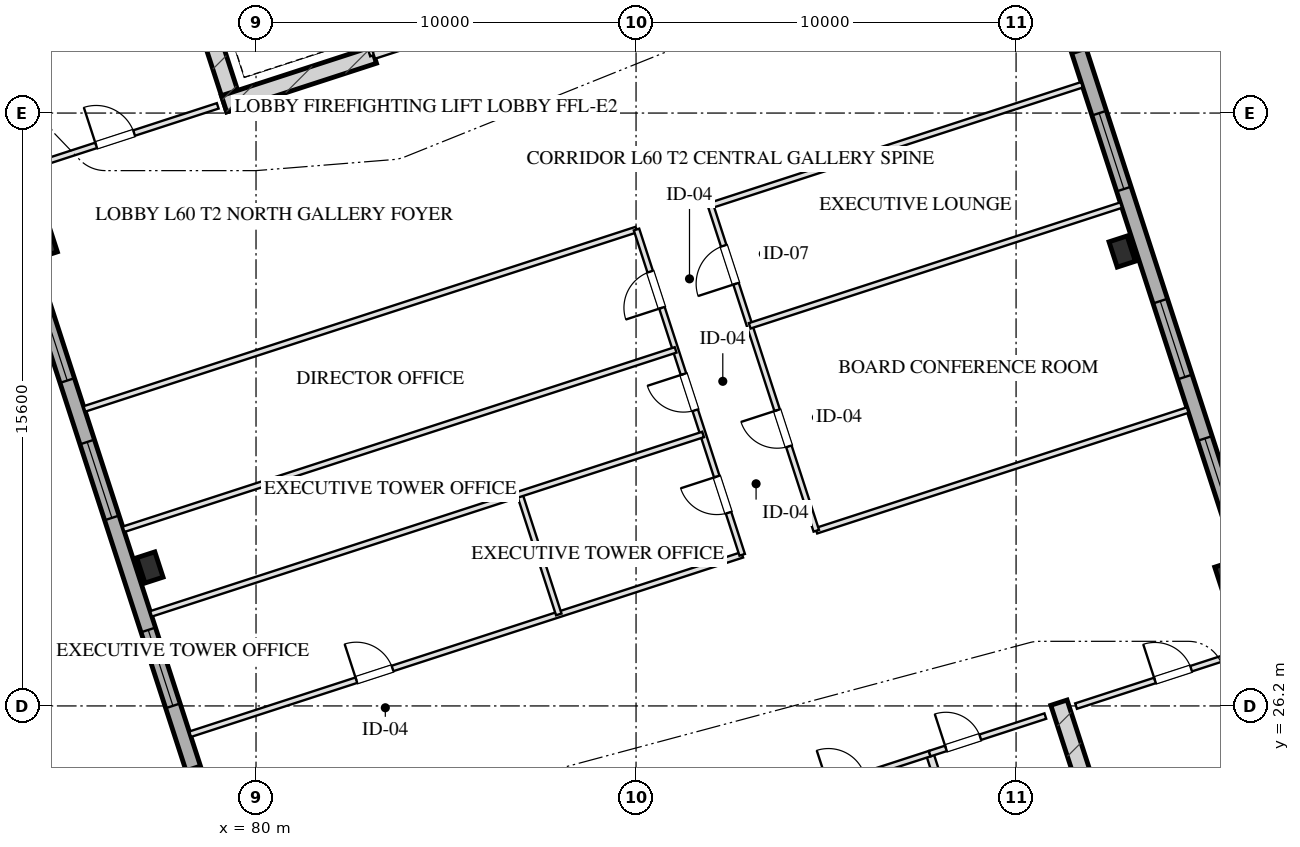
"""IFC4 building model, lengths in metres.
Left out: names, types, materials, properties, quantities, classifications, styles, units other than length and angle.
Written with IfcOpenShell. Run it as: python <this file> out.ifc"""

import sys

from ifc_helpers import new_model, si_unit, direction, frame, frame_2d, origin, origin_2d, place, context, subcontext, project, spatial, rectangle, hollow_rectangle, extrude, element, fill, save


model = new_model("IFC4")
c1 = context("Model", 3, precision=1e-05, world=origin(), true_north=direction((0.0, 1.0)))
c2 = subcontext(c1, "Body", "Model", "MODEL_VIEW")
j1 = project(units=[si_unit("LENGTHUNIT", "METRE"), si_unit("PLANEANGLEUNIT", "RADIAN")], contexts=[c1])
p1 = place(None, origin())
s1 = spatial("IfcSite", under=j1, at=p1, CompositionType="ELEMENT")
p2 = place(p1, origin())
s2 = spatial("IfcBuilding", under=s1, at=p2, CompositionType="ELEMENT")
p3 = place(p2, frame((0.0, 0.0, 223.1)))
s3 = spatial("IfcBuildingStorey", under=s2, at=p3, CompositionType="ELEMENT", Elevation=223.1)
for number, where, z_axis, x_axis in (
    (1, (101.128, 26.286, 0.0), (0.0, 0.0, 1.0), (0.309, -0.951, 0.0)),
    (2, (79.442, 41.899, 0.0), (0.0, 0.0, 1.0), (-0.309, 0.951, 0.0)),
):
    element("IfcWall", number, at=place(p3, frame(where, z_axis=z_axis, x_axis=x_axis)), inside=s3, PredefinedType="SHEAR", context=c2, shape_type="SweptSolid", body=[
        extrude(rectangle(XDim=9.33, YDim=0.45, at=frame_2d((4.665, 0.0))), origin(), (0.0, 0.0, 1.0), 3.45),
    ])
p4 = place(p3, frame((79.159, 42.043, 0.0), z_axis=(0.0, 0.0, 1.0), x_axis=(0.951047485828, 0.309044785913, 0.0)))
e3 = element("IfcWall", 3, at=p4, inside=s3, PredefinedType="SHEAR", context=c2, shape_type="SweptSolid", body=[
    extrude(rectangle(XDim=4.145, YDim=0.45, at=frame_2d((2.073, 0.0))), origin(), (0.0, 0.0, 1.0), 3.45),
])
for number, where, z_axis, x_axis in (
    (4, (77.208, 29.844, 0.0), (0.0, 0.0, 1.0), (0.951, 0.309, 0.0)),
    (5, (74.427, 38.403, 0.0), (0.0, 0.0, 1.0), (0.951, 0.309, 0.0)),
    (6, (105.573, 29.597, 0.0), (0.0, 0.0, 1.0), (0.951, 0.309, 0.0)),
    (7, (102.792, 38.156, 0.0), (0.0, 0.0, 1.0), (0.951, 0.309, 0.0)),
):
    element("IfcColumn", number, at=place(p3, frame(where, z_axis=z_axis, x_axis=x_axis)), inside=s3, PredefinedType="COLUMN", context=c2, shape_type="SweptSolid", body=[
        extrude(hollow_rectangle(XDim=0.5, YDim=0.7, WallThickness=0.025, at=origin_2d()), origin(), (0.0, 0.0, 1.0), 3.451),
    ])
p5 = place(p3, frame((82.618, 11.414, 0.0), z_axis=(0.0, 0.0, 1.0), x_axis=(-0.309016491071, 0.951056679828, 0.0)))
e8 = element("IfcWall", 8, at=p5, inside=s3, PredefinedType="SOLIDWALL", context=c2, shape_type="SweptSolid", body=[
    extrude(rectangle(XDim=38.4, YDim=0.4, at=frame_2d((19.2, 0.0))), origin(), (0.0, 0.0, 1.0), 2.61),
])
p6 = place(p5, frame((11.75, 0.0, 0.75)))
e9 = element("IfcOpeningElement", 9, at=p6, cuts=e8, PredefinedType="OPENING", context=c2, shape_type="SweptSolid", body=[
    extrude(rectangle(XDim=2.1, YDim=1.46, at=frame_2d((1.05, 0.73))), frame((0.0, 0.21, 0.0), z_axis=(0.0, -1.0, 0.0), x_axis=(1.0, 0.0, 0.0)), (0.0, 0.0, 1.0), 0.42),
])
p7 = place(p5, frame((15.55, 0.0, 0.75)))
e10 = element("IfcOpeningElement", 10, at=p7, cuts=e8, PredefinedType="OPENING", context=c2, shape_type="SweptSolid", body=[
    extrude(rectangle(XDim=2.1, YDim=1.46, at=frame_2d((1.05, 0.73))), frame((0.0, 0.21, 0.0), z_axis=(0.0, -1.0, 0.0), x_axis=(1.0, 0.0, 0.0)), (0.0, 0.0, 1.0), 0.42),
])
p8 = place(p5, frame((20.75, 0.0, 0.75)))
e11 = element("IfcOpeningElement", 11, at=p8, cuts=e8, PredefinedType="OPENING", context=c2, shape_type="SweptSolid", body=[
    extrude(rectangle(XDim=2.1, YDim=1.46, at=frame_2d((1.05, 0.73))), frame((0.0, 0.21, 0.0), z_axis=(0.0, -1.0, 0.0), x_axis=(1.0, 0.0, 0.0)), (0.0, 0.0, 1.0), 0.42),
])
p9 = place(p5, frame((24.55, 0.0, 0.75)))
e12 = element("IfcOpeningElement", 12, at=p9, cuts=e8, PredefinedType="OPENING", context=c2, shape_type="SweptSolid", body=[
    extrude(rectangle(XDim=2.1, YDim=1.46, at=frame_2d((1.05, 0.73))), frame((0.0, 0.21, 0.0), z_axis=(0.0, -1.0, 0.0), x_axis=(1.0, 0.0, 0.0)), (0.0, 0.0, 1.0), 0.42),
])
p10 = place(p3, frame((97.382, 56.586, 0.0), z_axis=(0.0, 0.0, 1.0), x_axis=(0.309016491071, -0.951056679828, 0.0)))
e13 = element("IfcWall", 13, at=p10, inside=s3, PredefinedType="SOLIDWALL", context=c2, shape_type="SweptSolid", body=[
    extrude(rectangle(XDim=38.4, YDim=0.4, at=frame_2d((19.2, 0.0))), origin(), (0.0, 0.0, 1.0), 2.61),
])
p11 = place(p10, frame((24.55, 0.0, 0.75)))
e14 = element("IfcOpeningElement", 14, at=p11, cuts=e13, PredefinedType="OPENING", context=c2, shape_type="SweptSolid", body=[
    extrude(rectangle(XDim=2.1, YDim=1.46, at=frame_2d((1.05, 0.73))), frame((0.0, 0.21, 0.0), z_axis=(0.0, -1.0, 0.0), x_axis=(1.0, 0.0, 0.0)), (0.0, 0.0, 1.0), 0.42),
])
p12 = place(p10, frame((20.75, 0.0, 0.75)))
e15 = element("IfcOpeningElement", 15, at=p12, cuts=e13, PredefinedType="OPENING", context=c2, shape_type="SweptSolid", body=[
    extrude(rectangle(XDim=2.1, YDim=1.46, at=frame_2d((1.05, 0.73))), frame((0.0, 0.21, 0.0), z_axis=(0.0, -1.0, 0.0), x_axis=(1.0, 0.0, 0.0)), (0.0, 0.0, 1.0), 0.42),
])
p13 = place(p10, frame((15.55, 0.0, 0.75)))
e16 = element("IfcOpeningElement", 16, at=p13, cuts=e13, PredefinedType="OPENING", context=c2, shape_type="SweptSolid", body=[
    extrude(rectangle(XDim=2.1, YDim=1.46, at=frame_2d((1.05, 0.73))), frame((0.0, 0.21, 0.0), z_axis=(0.0, -1.0, 0.0), x_axis=(1.0, 0.0, 0.0)), (0.0, 0.0, 1.0), 0.42),
])
p14 = place(p10, frame((11.75, 0.0, 0.75)))
e17 = element("IfcOpeningElement", 17, at=p14, cuts=e13, PredefinedType="OPENING", context=c2, shape_type="SweptSolid", body=[
    extrude(rectangle(XDim=2.1, YDim=1.46, at=frame_2d((1.05, 0.73))), frame((0.0, 0.21, 0.0), z_axis=(0.0, -1.0, 0.0), x_axis=(1.0, 0.0, 0.0)), (0.0, 0.0, 1.0), 0.42),
])
p15 = place(p3, frame((97.727, 24.944, 0.0), z_axis=(0.0, 0.0, 1.0), x_axis=(0.309016001439, -0.951056838919, 0.0)))
e18 = element("IfcWall", 18, at=p15, inside=s3, PredefinedType="PARTITIONING", context=c2, shape_type="SweptSolid", body=[
    extrude(rectangle(XDim=8.43, YDim=0.2, at=frame_2d((4.215, 0.0))), origin(), (0.0, 0.0, 1.0), 3.175),
])
p16 = place(p3, frame((93.542, 23.585, 0.0), z_axis=(0.0, 0.0, 1.0), x_axis=(0.951063829732, 0.308994485023, 0.0)))
e19 = element("IfcWall", 19, at=p16, inside=s3, PredefinedType="PARTITIONING", context=c2, shape_type="SweptSolid", body=[
    extrude(rectangle(XDim=4.4, YDim=0.15, at=frame_2d((2.2, 0.0))), origin(), (0.0, 0.0, 1.0), 3.175),
])
p17 = place(p16, frame((1.6, 0.0, 0.0)))
e20 = element("IfcOpeningElement", 20, at=p17, cuts=e19, PredefinedType="OPENING", context=c2, shape_type="SweptSolid", body=[
    extrude(rectangle(XDim=1.0, YDim=2.05, at=frame_2d((0.5, 1.025))), frame((0.0, 0.085, 0.0), z_axis=(0.0, -1.0, 0.0), x_axis=(1.0, 0.0, 0.0)), (0.0, 0.0, 1.0), 0.17),
])
p18 = place(p3, frame((97.727, 24.944, 0.0), z_axis=(0.0, 0.0, 1.0), x_axis=(0.951036872128, 0.309077446369, 0.0)))
e21 = element("IfcWall", 21, at=p18, inside=s3, PredefinedType="PARTITIONING", context=c2, shape_type="SweptSolid", body=[
    extrude(rectangle(XDim=3.2, YDim=0.15, at=frame_2d((1.6, 0.0))), origin(), (0.0, 0.0, 1.0), 3.175),
])
p19 = place(p18, frame((0.45, 0.0, 0.0)))
e22 = element("IfcOpeningElement", 22, at=p19, cuts=e21, PredefinedType="OPENING", context=c2, shape_type="SweptSolid", body=[
    extrude(rectangle(XDim=0.95, YDim=2.05, at=frame_2d((0.475, 1.025))), frame((0.0, 0.085, 0.0), z_axis=(0.0, -1.0, 0.0), x_axis=(1.0, 0.0, 0.0)), (0.0, 0.0, 1.0), 0.17),
])
p20 = place(p3, frame((83.101, 43.324, 0.0), z_axis=(0.0, 0.0, 1.0), x_axis=(-0.309048298632, 0.951046344356, 0.0)))
e23 = element("IfcWall", 23, at=p20, inside=s3, PredefinedType="PARTITIONING", context=c2, shape_type="SweptSolid", body=[
    extrude(rectangle(XDim=1.9, YDim=0.2, at=frame_2d((0.95, 0.0))), origin(), (0.0, 0.0, 1.0), 3.175),
])
p21 = place(p20, frame((0.52, 0.0, 0.0)))
e24 = element("IfcOpeningElement", 24, at=p21, cuts=e23, PredefinedType="OPENING", context=c2, shape_type="SweptSolid", body=[
    extrude(rectangle(XDim=1.1, YDim=2.05, at=frame_2d((0.55, 1.025))), frame((0.0, 0.11, 0.0), z_axis=(0.0, -1.0, 0.0), x_axis=(1.0, 0.0, 0.0)), (0.0, 0.0, 1.0), 0.22),
])
p22 = place(p3, frame((83.101, 43.324, 0.0), z_axis=(0.0, 0.0, 1.0), x_axis=(0.951052804469, 0.309028417967, 0.0)))
e25 = element("IfcWall", 25, at=p22, inside=s3, PredefinedType="PARTITIONING", context=c2, shape_type="SweptSolid", body=[
    extrude(rectangle(XDim=3.83, YDim=0.2, at=frame_2d((1.915, 0.0))), origin(), (0.0, 0.0, 1.0), 3.175),
])
p23 = place(p22, frame((1.35, 0.0, 0.0)))
e26 = element("IfcOpeningElement", 26, at=p23, cuts=e25, PredefinedType="OPENING", context=c2, shape_type="SweptSolid", body=[
    extrude(rectangle(XDim=1.2, YDim=2.05, at=frame_2d((0.6, 1.025))), frame((0.0, 0.11, 0.0), z_axis=(0.0, -1.0, 0.0), x_axis=(1.0, 0.0, 0.0)), (0.0, 0.0, 1.0), 0.22),
])
p24 = place(p3, frame((101.578, 26.196, 0.0), z_axis=(0.0, 0.0, 1.0), x_axis=(0.951064427824, 0.308992644131, 0.0)))
e27 = element("IfcWall", 27, at=p24, inside=s3, PredefinedType="PARTITIONING", context=c2, shape_type="SweptSolid", body=[
    extrude(rectangle(XDim=5.2, YDim=0.15, at=frame_2d((2.6, 0.0))), origin(), (0.0, 0.0, 1.0), 3.175),
])
p25 = place(p24, frame((2.184, 0.0, 0.0)))
e28 = element("IfcOpeningElement", 28, at=p25, cuts=e27, PredefinedType="OPENING", context=c2, shape_type="SweptSolid", body=[
    extrude(rectangle(XDim=1.0, YDim=2.05, at=frame_2d((0.5, 1.025))), frame((0.0, 0.085, 0.0), z_axis=(0.0, -1.0, 0.0), x_axis=(1.0, 0.0, 0.0)), (0.0, 0.0, 1.0), 0.17),
])
p26 = place(p3, frame((73.476, 40.197, 0.0), z_axis=(0.0, 0.0, 1.0), x_axis=(0.951059431056, 0.309008023519, 0.0)))
e29 = element("IfcWall", 29, at=p26, inside=s3, PredefinedType="PARTITIONING", context=c2, shape_type="SweptSolid", body=[
    extrude(rectangle(XDim=5.8, YDim=0.15, at=frame_2d((2.9, 0.0))), origin(), (0.0, 0.0, 1.0), 3.175),
])
p27 = place(p26, frame((2.436, 0.0, 0.0)))
e30 = element("IfcOpeningElement", 30, at=p27, cuts=e29, PredefinedType="OPENING", context=c2, shape_type="SweptSolid", body=[
    extrude(rectangle(XDim=1.05, YDim=2.05, at=frame_2d((0.525, 1.025))), frame((0.0, 0.085, 0.0), z_axis=(0.0, -1.0, 0.0), x_axis=(1.0, 0.0, 0.0)), (0.0, 0.0, 1.0), 0.17),
])
p28 = place(p3, frame((78.266, 25.456, 0.0), z_axis=(0.0, 0.0, 1.0), x_axis=(0.951056617779, 0.30901668204, 0.0)))
e31 = element("IfcWall", 31, at=p28, inside=s3, PredefinedType="PARTITIONING", context=c2, shape_type="SweptSolid", body=[
    extrude(rectangle(XDim=15.275, YDim=0.15, at=frame_2d((7.637, 0.0))), origin(), (0.0, 0.0, 1.0), 3.175),
])
p29 = place(p28, frame((4.6, 0.0, 0.0)))
e32 = element("IfcOpeningElement", 32, at=p29, cuts=e31, PredefinedType="OPENING", context=c2, shape_type="SweptSolid", body=[
    extrude(rectangle(XDim=1.0, YDim=2.05, at=frame_2d((0.5, 1.025))), frame((0.0, 0.085, 0.0), z_axis=(0.0, -1.0, 0.0), x_axis=(1.0, 0.0, 0.0)), (0.0, 0.0, 1.0), 0.17),
])
p30 = place(p3, frame((94.743, 30.81, 0.0), z_axis=(0.0, 0.0, 1.0), x_axis=(0.951058162647, 0.309011927378, 0.0)))
e33 = element("IfcWall", 33, at=p30, inside=s3, PredefinedType="PARTITIONING", context=c2, shape_type="SweptSolid", body=[
    extrude(rectangle(XDim=10.275, YDim=0.15, at=frame_2d((5.137, 0.0))), origin(), (0.0, 0.0, 1.0), 3.175),
])
p31 = place(p3, frame((75.485, 34.015, 0.0), z_axis=(0.0, 0.0, 1.0), x_axis=(0.951056617779, 0.30901668204, 0.0)))
e34 = element("IfcWall", 34, at=p31, inside=s3, PredefinedType="PARTITIONING", context=c2, shape_type="SweptSolid", body=[
    extrude(rectangle(XDim=15.275, YDim=0.15, at=frame_2d((7.637, 0.0))), origin(), (0.0, 0.0, 1.0), 3.175),
])
p32 = place(p3, frame((91.962, 39.369, 0.0), z_axis=(0.0, 0.0, 1.0), x_axis=(0.951058162647, 0.309011927378, 0.0)))
e35 = element("IfcWall", 35, at=p32, inside=s3, PredefinedType="PARTITIONING", context=c2, shape_type="SweptSolid", body=[
    extrude(rectangle(XDim=10.275, YDim=0.15, at=frame_2d((5.137, 0.0))), origin(), (0.0, 0.0, 1.0), 3.175),
])
p33 = place(p3, frame((92.793, 30.176, 0.0), z_axis=(0.0, 0.0, 1.0), x_axis=(-0.309024734286, 0.951054001411, 0.0)))
e36 = element("IfcWall", 36, at=p33, inside=s3, PredefinedType="PARTITIONING", context=c2, shape_type="SweptSolid", body=[
    extrude(rectangle(XDim=9.0, YDim=0.15, at=frame_2d((4.5, 0.0))), origin(), (0.0, 0.0, 1.0), 3.175),
])
p34 = place(p33, frame((1.165, 0.0, 0.0)))
e37 = element("IfcOpeningElement", 37, at=p34, cuts=e36, PredefinedType="OPENING", context=c2, shape_type="SweptSolid", body=[
    extrude(rectangle(XDim=1.0, YDim=2.05, at=frame_2d((0.5, 1.025))), frame((0.0, 0.085, 0.0), z_axis=(0.0, -1.0, 0.0), x_axis=(1.0, 0.0, 0.0)), (0.0, 0.0, 1.0), 0.17),
])
p35 = place(p33, frame((4.0, 0.0, 0.0)))
e38 = element("IfcOpeningElement", 38, at=p35, cuts=e36, PredefinedType="OPENING", context=c2, shape_type="SweptSolid", body=[
    extrude(rectangle(XDim=1.0, YDim=2.05, at=frame_2d((0.5, 1.025))), frame((0.0, 0.085, 0.0), z_axis=(0.0, -1.0, 0.0), x_axis=(1.0, 0.0, 0.0)), (0.0, 0.0, 1.0), 0.17),
])
p36 = place(p33, frame((6.835, 0.0, 0.0)))
e39 = element("IfcOpeningElement", 39, at=p36, cuts=e36, PredefinedType="OPENING", context=c2, shape_type="SweptSolid", body=[
    extrude(rectangle(XDim=1.0, YDim=2.05, at=frame_2d((0.5, 1.025))), frame((0.0, 0.085, 0.0), z_axis=(0.0, -1.0, 0.0), x_axis=(1.0, 0.0, 0.0)), (0.0, 0.0, 1.0), 0.17),
])
p37 = place(p3, frame((94.743, 30.81, 0.0), z_axis=(0.0, 0.0, 1.0), x_axis=(-0.309024734286, 0.951054001411, 0.0)))
e40 = element("IfcWall", 40, at=p37, inside=s3, PredefinedType="PARTITIONING", context=c2, shape_type="SweptSolid", body=[
    extrude(rectangle(XDim=9.0, YDim=0.15, at=frame_2d((4.5, 0.0))), origin(), (0.0, 0.0, 1.0), 3.175),
])
p38 = place(p37, frame((2.335, 0.0, 0.0)))
e41 = element("IfcOpeningElement", 41, at=p38, cuts=e40, PredefinedType="OPENING", context=c2, shape_type="SweptSolid", body=[
    extrude(rectangle(XDim=1.0, YDim=2.05, at=frame_2d((0.5, 1.025))), frame((0.0, 0.085, 0.0), z_axis=(0.0, -1.0, 0.0), x_axis=(1.0, 0.0, 0.0)), (0.0, 0.0, 1.0), 0.17),
])
p39 = place(p37, frame((6.835, 0.0, 0.0)))
e42 = element("IfcOpeningElement", 42, at=p39, cuts=e40, PredefinedType="OPENING", context=c2, shape_type="SweptSolid", body=[
    extrude(rectangle(XDim=1.05, YDim=2.05, at=frame_2d((0.525, 1.025))), frame((0.0, 0.085, 0.0), z_axis=(0.0, -1.0, 0.0), x_axis=(1.0, 0.0, 0.0)), (0.0, 0.0, 1.0), 0.17),
])
p40 = place(p3, frame((87.967, 28.608, 0.0), z_axis=(0.0, 0.0, 1.0), x_axis=(-0.309004845045, 0.951060463766, 0.0)))
e43 = element("IfcWall", 43, at=p40, inside=s3, PredefinedType="PARTITIONING", context=c2, shape_type="SweptSolid", body=[
    extrude(rectangle(XDim=3.33, YDim=0.15, at=frame_2d((1.665, 0.0))), origin(), (0.0, 0.0, 1.0), 3.175),
])
for number, where, z_axis, x_axis in (
    (44, (77.237, 28.623, 0.0), (0.0, 0.0, 1.0), (0.951, 0.309, 0.0)),
    (45, (76.514, 30.848, 0.0), (0.0, 0.0, 1.0), (0.951, 0.309, 0.0)),
):
    element("IfcWall", number, at=place(p3, frame(where, z_axis=z_axis, x_axis=x_axis)), inside=s3, PredefinedType="PARTITIONING", context=c2, shape_type="SweptSolid", body=[
        extrude(rectangle(XDim=15.275, YDim=0.15, at=frame_2d((7.637, 0.0))), origin(), (0.0, 0.0, 1.0), 3.175),
    ])
p41 = place(p3, frame((92.991, 36.202, 0.0), z_axis=(0.0, 0.0, 1.0), x_axis=(0.951051179373, 0.309033419251, 0.0)))
e46 = element("IfcWall", 46, at=p41, inside=s3, PredefinedType="PARTITIONING", context=c2, shape_type="SweptSolid", body=[
    extrude(rectangle(XDim=10.275, YDim=0.15, at=frame_2d((5.137, 0.0))), origin(), (0.0, 0.0, 1.0), 3.175),
])
p42 = place(p6, origin())
e47 = element("IfcWindow", 47, at=p42, inside=s3, PartitioningType="TRIPLE_PANEL_VERTICAL", PredefinedType="WINDOW", context=c2, shape_type="SweptSolid", body=[
    extrude(rectangle(XDim=2.1, YDim=1.46, at=frame_2d((1.05, 0.73))), frame((0.0, 0.03, 0.0), z_axis=(0.0, -1.0, 0.0), x_axis=(1.0, 0.0, 0.0)), (0.0, 0.0, 1.0), 0.06),
])
fill(e9, e47)
p43 = place(p7, origin())
e48 = element("IfcWindow", 48, at=p43, inside=s3, PartitioningType="TRIPLE_PANEL_VERTICAL", PredefinedType="WINDOW", context=c2, shape_type="SweptSolid", body=[
    extrude(rectangle(XDim=2.1, YDim=1.46, at=frame_2d((1.05, 0.73))), frame((0.0, 0.03, 0.0), z_axis=(0.0, -1.0, 0.0), x_axis=(1.0, 0.0, 0.0)), (0.0, 0.0, 1.0), 0.06),
])
fill(e10, e48)
p44 = place(p8, origin())
e49 = element("IfcWindow", 49, at=p44, inside=s3, PartitioningType="TRIPLE_PANEL_VERTICAL", PredefinedType="WINDOW", context=c2, shape_type="SweptSolid", body=[
    extrude(rectangle(XDim=2.1, YDim=1.46, at=frame_2d((1.05, 0.73))), frame((0.0, 0.03, 0.0), z_axis=(0.0, -1.0, 0.0), x_axis=(1.0, 0.0, 0.0)), (0.0, 0.0, 1.0), 0.06),
])
fill(e11, e49)
p45 = place(p9, origin())
e50 = element("IfcWindow", 50, at=p45, inside=s3, PartitioningType="TRIPLE_PANEL_VERTICAL", PredefinedType="WINDOW", context=c2, shape_type="SweptSolid", body=[
    extrude(rectangle(XDim=2.1, YDim=1.46, at=frame_2d((1.05, 0.73))), frame((0.0, 0.03, 0.0), z_axis=(0.0, -1.0, 0.0), x_axis=(1.0, 0.0, 0.0)), (0.0, 0.0, 1.0), 0.06),
])
fill(e12, e50)
p46 = place(p11, origin())
e51 = element("IfcWindow", 51, at=p46, inside=s3, PartitioningType="TRIPLE_PANEL_VERTICAL", PredefinedType="WINDOW", context=c2, shape_type="SweptSolid", body=[
    extrude(rectangle(XDim=2.1, YDim=1.46, at=frame_2d((1.05, 0.73))), frame((0.0, 0.03, 0.0), z_axis=(0.0, -1.0, 0.0), x_axis=(1.0, 0.0, 0.0)), (0.0, 0.0, 1.0), 0.06),
])
fill(e14, e51)
p47 = place(p12, origin())
e52 = element("IfcWindow", 52, at=p47, inside=s3, PartitioningType="TRIPLE_PANEL_VERTICAL", PredefinedType="WINDOW", context=c2, shape_type="SweptSolid", body=[
    extrude(rectangle(XDim=2.1, YDim=1.46, at=frame_2d((1.05, 0.73))), frame((0.0, 0.03, 0.0), z_axis=(0.0, -1.0, 0.0), x_axis=(1.0, 0.0, 0.0)), (0.0, 0.0, 1.0), 0.06),
])
fill(e15, e52)
p48 = place(p13, origin())
e53 = element("IfcWindow", 53, at=p48, inside=s3, PartitioningType="TRIPLE_PANEL_VERTICAL", PredefinedType="WINDOW", context=c2, shape_type="SweptSolid", body=[
    extrude(rectangle(XDim=2.1, YDim=1.46, at=frame_2d((1.05, 0.73))), frame((0.0, 0.03, 0.0), z_axis=(0.0, -1.0, 0.0), x_axis=(1.0, 0.0, 0.0)), (0.0, 0.0, 1.0), 0.06),
])
fill(e16, e53)
p49 = place(p14, origin())
e54 = element("IfcWindow", 54, at=p49, inside=s3, PartitioningType="TRIPLE_PANEL_VERTICAL", PredefinedType="WINDOW", context=c2, shape_type="SweptSolid", body=[
    extrude(rectangle(XDim=2.1, YDim=1.46, at=frame_2d((1.05, 0.73))), frame((0.0, 0.03, 0.0), z_axis=(0.0, -1.0, 0.0), x_axis=(1.0, 0.0, 0.0)), (0.0, 0.0, 1.0), 0.06),
])
fill(e17, e54)
p50 = place(p19, origin())
e55 = element("IfcDoor", 55, at=p50, inside=s3, OperationType="SINGLE_SWING_LEFT", PredefinedType="DOOR", context=c2, shape_type="SweptSolid", body=[
    extrude(rectangle(XDim=0.95, YDim=2.05, at=frame_2d((0.475, 1.025))), frame((0.0, 0.025, 0.0), z_axis=(0.0, -1.0, 0.0), x_axis=(1.0, 0.0, 0.0)), (0.0, 0.0, 1.0), 0.05),
])
fill(e22, e55)
p51 = place(p25, origin())
e56 = element("IfcDoor", 56, at=p51, inside=s3, OperationType="SINGLE_SWING_LEFT", PredefinedType="DOOR", context=c2, shape_type="SweptSolid", body=[
    extrude(rectangle(XDim=1.0, YDim=2.05, at=frame_2d((0.5, 1.025))), frame((0.0, 0.025, 0.0), z_axis=(0.0, -1.0, 0.0), x_axis=(1.0, 0.0, 0.0)), (0.0, 0.0, 1.0), 0.05),
])
fill(e28, e56)
p52 = place(p27, origin())
e57 = element("IfcDoor", 57, at=p52, inside=s3, OperationType="SINGLE_SWING_LEFT", PredefinedType="DOOR", context=c2, shape_type="SweptSolid", body=[
    extrude(rectangle(XDim=1.05, YDim=2.05, at=frame_2d((0.525, 1.025))), frame((0.0, 0.025, 0.0), z_axis=(0.0, -1.0, 0.0), x_axis=(1.0, 0.0, 0.0)), (0.0, 0.0, 1.0), 0.05),
])
fill(e30, e57)
p53 = place(p29, origin())
e58 = element("IfcDoor", 58, at=p53, inside=s3, OperationType="SINGLE_SWING_LEFT", PredefinedType="DOOR", context=c2, shape_type="SweptSolid", body=[
    extrude(rectangle(XDim=1.0, YDim=2.05, at=frame_2d((0.5, 1.025))), frame((0.0, 0.025, 0.0), z_axis=(0.0, -1.0, 0.0), x_axis=(1.0, 0.0, 0.0)), (0.0, 0.0, 1.0), 0.05),
])
fill(e32, e58)
p54 = place(p34, origin())
e59 = element("IfcDoor", 59, at=p54, inside=s3, OperationType="SINGLE_SWING_RIGHT", PredefinedType="DOOR", context=c2, shape_type="SweptSolid", body=[
    extrude(rectangle(XDim=1.0, YDim=2.05, at=frame_2d((0.5, 1.025))), frame((0.0, 0.025, 0.0), z_axis=(0.0, -1.0, 0.0), x_axis=(1.0, 0.0, 0.0)), (0.0, 0.0, 1.0), 0.05),
])
fill(e37, e59)
p55 = place(p35, origin())
e60 = element("IfcDoor", 60, at=p55, inside=s3, OperationType="SINGLE_SWING_RIGHT", PredefinedType="DOOR", context=c2, shape_type="SweptSolid", body=[
    extrude(rectangle(XDim=1.0, YDim=2.05, at=frame_2d((0.5, 1.025))), frame((0.0, 0.025, 0.0), z_axis=(0.0, -1.0, 0.0), x_axis=(1.0, 0.0, 0.0)), (0.0, 0.0, 1.0), 0.05),
])
fill(e38, e60)
p56 = place(p36, origin())
e61 = element("IfcDoor", 61, at=p56, inside=s3, OperationType="SINGLE_SWING_LEFT", PredefinedType="DOOR", context=c2, shape_type="SweptSolid", body=[
    extrude(rectangle(XDim=1.0, YDim=2.05, at=frame_2d((0.5, 1.025))), frame((0.0, 0.025, 0.0), z_axis=(0.0, -1.0, 0.0), x_axis=(1.0, 0.0, 0.0)), (0.0, 0.0, 1.0), 0.05),
])
fill(e39, e61)
p57 = place(p38, origin())
e62 = element("IfcDoor", 62, at=p57, inside=s3, OperationType="SINGLE_SWING_RIGHT", PredefinedType="DOOR", context=c2, shape_type="SweptSolid", body=[
    extrude(rectangle(XDim=1.0, YDim=2.05, at=frame_2d((0.5, 1.025))), frame((0.0, 0.025, 0.0), z_axis=(0.0, -1.0, 0.0), x_axis=(1.0, 0.0, 0.0)), (0.0, 0.0, 1.0), 0.05),
])
fill(e41, e62)
p58 = place(p39, origin())
e63 = element("IfcDoor", 63, at=p58, inside=s3, OperationType="SINGLE_SWING_LEFT", PredefinedType="DOOR", context=c2, shape_type="SweptSolid", body=[
    extrude(rectangle(XDim=1.05, YDim=2.05, at=frame_2d((0.525, 1.025))), frame((0.0, 0.025, 0.0), z_axis=(0.0, -1.0, 0.0), x_axis=(1.0, 0.0, 0.0)), (0.0, 0.0, 1.0), 0.05),
])
fill(e42, e63)
save(model, sys.argv[1])
